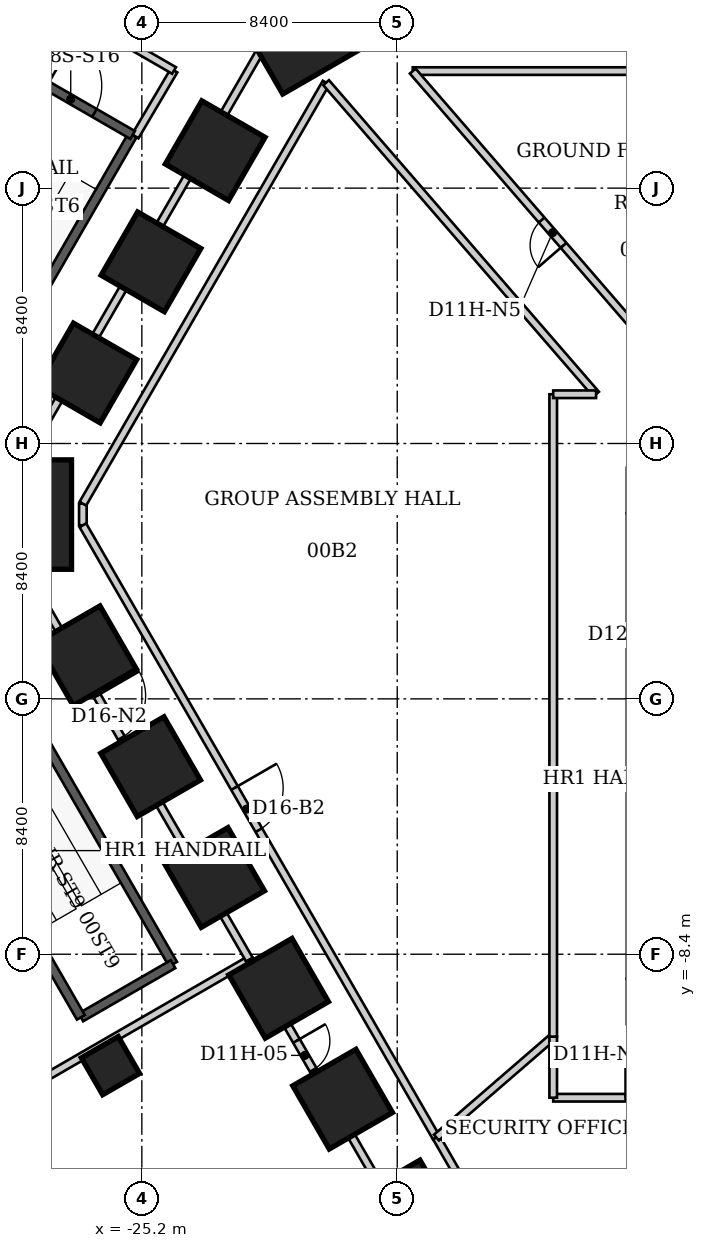
"""IFC4 building model, lengths in metres.
Left out: names, types, materials, properties, quantities, classifications, styles, units other than length and angle.
Written with IfcOpenShell. Run it as: python <this file> out.ifc"""

import sys

from ifc_helpers import new_model, si_unit, direction, frame, frame_2d, origin, origin_2d, place, context, subcontext, project, spatial, rectangle, extrude, element, fill, save


model = new_model("IFC4")
c1 = context("Model", 3, precision=1e-05, world=origin(), true_north=direction((0.0, 1.0)))
c2 = subcontext(c1, "Body", "Model", "MODEL_VIEW")
j1 = project(units=[si_unit("LENGTHUNIT", "METRE"), si_unit("PLANEANGLEUNIT", "RADIAN")], contexts=[c1])
p1 = place(None, origin())
s1 = spatial("IfcSite", under=j1, at=p1, CompositionType="ELEMENT")
p2 = place(p1, origin())
s2 = spatial("IfcBuilding", under=s1, at=p2, CompositionType="ELEMENT")
p3 = place(p2, origin())
s3 = spatial("IfcBuildingStorey", under=s2, at=p3, CompositionType="ELEMENT", Elevation=0.0)
for number, where, z_axis, x_axis in (
    (1, (-16.491, -16.813, -0.2), (0.0, 0.0, 1.0), (-0.866, -0.5, 0.0)),
    (2, (-18.596, -13.167, -0.2), (0.0, 0.0, 1.0), (-0.866, -0.5, 0.0)),
    (3, (-20.701, -9.521, -0.2), (0.0, 0.0, 1.0), (-0.866, -0.5, 0.0)),
    (4, (-22.806, -5.875, -0.2), (0.0, 0.0, 1.0), (-0.866, -0.5, 0.0)),
    (5, (-24.911, -2.23, -0.2), (0.0, 0.0, 1.0), (-0.866, -0.5, 0.0)),
    (6, (-27.016, 1.416, -0.2), (0.0, 0.0, 1.0), (-0.866, -0.5, 0.0)),
):
    element("IfcColumn", number, at=place(p3, frame(where, z_axis=z_axis, x_axis=x_axis)), inside=s3, PredefinedType="COLUMN", context=c2, shape_type="SweptSolid", body=[
        extrude(rectangle(XDim=2.4, YDim=2.4, at=origin_2d()), origin(), (0.0, 0.0, 1.0), 6.2),
    ])
p4 = place(p3, frame((-28.713, 6.062, -0.2), z_axis=(0.0, 0.0, 1.0), x_axis=(-1.0, 0.0, 0.0)))
e7 = element("IfcColumn", 7, at=p4, inside=s3, PredefinedType="COLUMN", context=c2, shape_type="SweptSolid", body=[
    extrude(rectangle(XDim=2.4, YDim=3.6, at=origin_2d()), origin(), (0.0, 0.0, 1.0), 6.2),
])
for number, where, z_axis, x_axis in (
    (8, (-27.01, 10.719, -0.2), (0.0, 0.0, 1.0), (-0.866, 0.5, 0.0)),
    (9, (-24.899, 14.375, -0.2), (0.0, 0.0, 1.0), (-0.866, 0.5, 0.0)),
    (10, (-22.788, 18.032, -0.2), (0.0, 0.0, 1.0), (-0.866, 0.5, 0.0)),
):
    element("IfcColumn", number, at=place(p3, frame(where, z_axis=z_axis, x_axis=x_axis)), inside=s3, PredefinedType="COLUMN", context=c2, shape_type="SweptSolid", body=[
        extrude(rectangle(XDim=2.4, YDim=2.4, at=origin_2d()), origin(), (0.0, 0.0, 1.0), 6.2),
    ])
p5 = place(p3, frame((-19.606, 21.835, -0.2), z_axis=(0.0, 0.0, 1.0), x_axis=(-0.5, 0.866025403784, 0.0)))
e11 = element("IfcColumn", 11, at=p5, inside=s3, PredefinedType="COLUMN", context=c2, shape_type="SweptSolid", body=[
    extrude(rectangle(XDim=2.4, YDim=3.6, at=origin_2d()), origin(), (0.0, 0.0, 1.0), 6.2),
])
p6 = place(p3, frame((-26.233, -12.065, -0.2), z_axis=(0.0, 0.0, 1.0), x_axis=(-0.866025403784, -0.5, 0.0)))
e12 = element("IfcColumn", 12, at=p6, inside=s3, PredefinedType="COLUMN", context=c2, shape_type="SweptSolid", body=[
    extrude(rectangle(XDim=1.4, YDim=1.4, at=origin_2d()), origin(), (0.0, 0.0, 1.0), 6.2),
])
p7 = place(p3, frame((-33.964, -15.685, 0.0), z_axis=(0.0, 0.0, 1.0), x_axis=(0.865990423019, 0.500060583569, 0.0)))
e13 = element("IfcWall", 13, at=p7, inside=s3, PredefinedType="PARTITIONING", context=c2, shape_type="SweptSolid", body=[
    extrude(rectangle(XDim=14.208, YDim=0.25, at=frame_2d((7.104, 0.0))), origin(), (0.0, 0.0, 1.0), 4.993),
])
p8 = place(p3, frame((-29.54, 5.06, 0.0), z_axis=(0.0, 0.0, 1.0), x_axis=(0.500237574973, -0.865888196354, 0.0)))
e14 = element("IfcWall", 14, at=p8, inside=s3, PredefinedType="PARTITIONING", context=c2, shape_type="SweptSolid", body=[
    extrude(rectangle(XDim=15.753, YDim=0.25, at=frame_2d((7.876, 0.0))), origin(), (0.0, 0.0, 1.0), 4.04),
])
p9 = place(p8, frame((5.726, 0.0, 0.0)))
e15 = element("IfcOpeningElement", 15, at=p9, cuts=e14, PredefinedType="OPENING", context=c2, shape_type="SweptSolid", body=[
    extrude(rectangle(XDim=1.6, YDim=2.4, at=frame_2d((0.8, 1.2))), frame((0.0, 0.125, 0.0), z_axis=(0.0, -1.0, 0.0), x_axis=(1.0, 0.0, 0.0)), (0.0, 0.0, 1.0), 0.25),
])
p10 = place(p3, frame((-27.14, 5.71, 0.0), z_axis=(0.0, 0.0, 1.0), x_axis=(0.0, 1.0, 0.0)))
e16 = element("IfcWall", 16, at=p10, inside=s3, PredefinedType="PARTITIONING", context=c2, shape_type="SweptSolid", body=[
    extrude(rectangle(XDim=0.71, YDim=0.25, at=frame_2d((0.355, 0.0))), origin(), (0.0, 0.0, 1.0), 5.84),
])
p11 = place(p3, frame((-27.14, 5.71, 0.0), z_axis=(0.0, 0.0, 1.0), x_axis=(0.499871788402, -0.866099414132, 0.0)))
e17 = element("IfcWall", 17, at=p11, inside=s3, PredefinedType="PARTITIONING", context=c2, shape_type="SweptSolid", body=[
    extrude(rectangle(XDim=23.257, YDim=0.25, at=frame_2d((11.628, 0.0))), origin(), (0.0, 0.0, 1.0), 5.84),
])
p12 = place(p11, frame((9.979, 0.0, 0.0)))
e18 = element("IfcOpeningElement", 18, at=p12, cuts=e17, PredefinedType="OPENING", context=c2, shape_type="SweptSolid", body=[
    extrude(rectangle(XDim=1.6, YDim=2.4, at=frame_2d((0.8, 1.2))), frame((0.0, 0.125, 0.0), z_axis=(0.0, -1.0, 0.0), x_axis=(1.0, 0.0, 0.0)), (0.0, 0.0, 1.0), 0.25),
])
p13 = place(p3, frame((-27.14, 6.42, 0.0), z_axis=(0.0, 0.0, 1.0), x_axis=(0.50017078562, 0.865926778205, 0.0)))
e19 = element("IfcWall", 19, at=p13, inside=s3, PredefinedType="PARTITIONING", context=c2, shape_type="SweptSolid", body=[
    extrude(rectangle(XDim=15.995, YDim=0.25, at=frame_2d((7.997, 0.0))), origin(), (0.0, 0.0, 1.0), 5.84),
])
p14 = place(p3, frame((-25.42, 18.5, 0.0), z_axis=(0.0, 0.0, 1.0), x_axis=(0.508082727165, 0.861308273707, 0.0)))
e20 = element("IfcWall", 20, at=p14, inside=s3, PredefinedType="PARTITIONING", context=c2, shape_type="SweptSolid", body=[
    extrude(rectangle(XDim=2.519, YDim=0.25, at=frame_2d((1.26, 0.0))), origin(), (0.0, 0.0, 1.0), 5.84),
])
p15 = place(p3, frame((-24.14, 20.67, 0.0), z_axis=(0.0, 0.0, 1.0), x_axis=(-0.866003524369, 0.500037894345, 0.0)))
e21 = element("IfcWall", 21, at=p15, inside=s3, PredefinedType="PARTITIONING", context=c2, shape_type="SweptSolid", body=[
    extrude(rectangle(XDim=15.409, YDim=0.25, at=frame_2d((7.705, 0.0))), origin(), (0.0, 0.0, 1.0), 5.083),
])
p16 = place(p3, frame((-21.66, -8.58, 0.0), z_axis=(0.0, 0.0, 1.0), x_axis=(0.50046740921, -0.865755376719, 0.0)))
e22 = element("IfcWall", 22, at=p16, inside=s3, PredefinedType="PARTITIONING", context=c2, shape_type="SweptSolid", body=[
    extrude(rectangle(XDim=9.171, YDim=0.25, at=frame_2d((4.585, 0.0))), origin(), (0.0, 0.0, 1.0), 4.04),
])
p17 = place(p16, frame((3.086, 0.0, 0.0)))
e23 = element("IfcOpeningElement", 23, at=p17, cuts=e22, PredefinedType="OPENING", context=c2, shape_type="SweptSolid", body=[
    extrude(rectangle(XDim=1.1, YDim=2.2, at=frame_2d((0.55, 1.1))), frame((0.0, 0.125, 0.0), z_axis=(0.0, -1.0, 0.0), x_axis=(1.0, 0.0, 0.0)), (0.0, 0.0, 1.0), 0.25),
])
p18 = place(p3, frame((-20.88, 22.05, 0.0), z_axis=(0.0, 0.0, 1.0), x_axis=(-0.500246113481, -0.865883263464, 0.0)))
e24 = element("IfcWall", 24, at=p18, inside=s3, PredefinedType="PARTITIONING", context=c2, shape_type="SweptSolid", body=[
    extrude(rectangle(XDim=17.312, YDim=0.25, at=frame_2d((8.656, 0.0))), origin(), (0.0, 0.0, 1.0), 4.04),
])
p19 = place(p3, frame((-19.14, 20.27, 0.0), z_axis=(0.0, 0.0, 1.0), x_axis=(0.654785227324, -0.755814994611, 0.0)))
e25 = element("IfcWall", 25, at=p19, inside=s3, PredefinedType="PARTITIONING", context=c2, shape_type="SweptSolid", body=[
    extrude(rectangle(XDim=13.562, YDim=0.25, at=frame_2d((6.781, 0.0))), origin(), (0.0, 0.0, 1.0), 5.84),
])
p20 = place(p3, frame((-16.29, 20.65, 0.0), z_axis=(0.0, 0.0, 1.0), x_axis=(1.0, 0.0, 0.0)))
e26 = element("IfcWall", 26, at=p20, inside=s3, PredefinedType="PARTITIONING", context=c2, shape_type="SweptSolid", body=[
    extrude(rectangle(XDim=12.29, YDim=0.25, at=frame_2d((6.145, 0.0))), origin(), (0.0, 0.0, 1.0), 5.84),
])
p21 = place(p3, frame((-15.51, -14.43, 0.0), z_axis=(0.0, 0.0, 1.0), x_axis=(0.497894326365, -0.867237706614, 0.0)))
e27 = element("IfcWall", 27, at=p21, inside=s3, PredefinedType="PARTITIONING", context=c2, shape_type="SweptSolid", body=[
    extrude(rectangle(XDim=2.41, YDim=0.25, at=frame_2d((1.205, 0.0))), origin(), (0.0, 0.0, 1.0), 5.84),
])
p22 = place(p3, frame((-11.67, -13.12, 0.0), z_axis=(0.0, 0.0, 1.0), x_axis=(1.0, 0.0, 0.0)))
e28 = element("IfcWall", 28, at=p22, inside=s3, PredefinedType="PARTITIONING", context=c2, shape_type="SweptSolid", body=[
    extrude(rectangle(XDim=5.86, YDim=0.25, at=frame_2d((2.93, 0.0))), origin(), (0.0, 0.0, 1.0), 5.84),
])
p23 = place(p22, frame((2.38, 0.0, 0.0)))
e29 = element("IfcOpeningElement", 29, at=p23, cuts=e28, PredefinedType="OPENING", context=c2, shape_type="SweptSolid", body=[
    extrude(rectangle(XDim=1.1, YDim=2.2, at=frame_2d((0.55, 1.1))), frame((0.0, 0.125, 0.0), z_axis=(0.0, -1.0, 0.0), x_axis=(1.0, 0.0, 0.0)), (0.0, 0.0, 1.0), 0.25),
])
p24 = place(p3, frame((-11.67, -11.11, 0.0), z_axis=(0.0, 0.0, 1.0), x_axis=(-0.756493073491, -0.654001704707, 0.0)))
e30 = element("IfcWall", 30, at=p24, inside=s3, PredefinedType="PARTITIONING", context=c2, shape_type="SweptSolid", body=[
    extrude(rectangle(XDim=5.076, YDim=0.25, at=frame_2d((2.538, 0.0))), origin(), (0.0, 0.0, 1.0), 5.238),
])
p25 = place(p3, frame((-11.67, -11.11, 0.0), z_axis=(0.0, 0.0, 1.0), x_axis=(0.0, -1.0, 0.0)))
e31 = element("IfcWall", 31, at=p25, inside=s3, PredefinedType="PARTITIONING", context=c2, shape_type="SweptSolid", body=[
    extrude(rectangle(XDim=2.01, YDim=0.25, at=frame_2d((1.005, 0.0))), origin(), (0.0, 0.0, 1.0), 5.84),
])
p26 = place(p3, frame((-11.67, 10.02, 0.0), z_axis=(0.0, 0.0, 1.0), x_axis=(0.0, -1.0, 0.0)))
e32 = element("IfcWall", 32, at=p26, inside=s3, PredefinedType="PARTITIONING", context=c2, shape_type="SweptSolid", body=[
    extrude(rectangle(XDim=21.13, YDim=0.25, at=frame_2d((10.565, 0.0))), origin(), (0.0, 0.0, 1.0), 5.84),
])
p27 = place(p3, frame((-10.26, 10.02, 0.0), z_axis=(0.0, 0.0, 1.0), x_axis=(-1.0, 0.0, 0.0)))
e33 = element("IfcWall", 33, at=p27, inside=s3, PredefinedType="PARTITIONING", context=c2, shape_type="SweptSolid", body=[
    extrude(rectangle(XDim=1.41, YDim=0.25, at=frame_2d((0.705, 0.0))), origin(), (0.0, 0.0, 1.0), 5.84),
])
p28 = place(p3, frame((-7.09, 10.02, 0.0), z_axis=(0.0, 0.0, 1.0), x_axis=(-0.654417990957, 0.756132986393, 0.0)))
e34 = element("IfcWall", 34, at=p28, inside=s3, PredefinedType="PARTITIONING", context=c2, shape_type="SweptSolid", body=[
    extrude(rectangle(XDim=14.058, YDim=0.25, at=frame_2d((7.029, 0.0))), origin(), (0.0, 0.0, 1.0), 5.84),
])
p29 = place(p28, frame((6.479, 0.0, 0.0)))
e35 = element("IfcOpeningElement", 35, at=p29, cuts=e34, PredefinedType="OPENING", context=c2, shape_type="SweptSolid", body=[
    extrude(rectangle(XDim=1.1, YDim=2.2, at=frame_2d((0.55, 1.1))), frame((0.0, 0.125, 0.0), z_axis=(0.0, -1.0, 0.0), x_axis=(1.0, 0.0, 0.0)), (0.0, 0.0, 1.0), 0.25),
])
p30 = place(p3, frame((-25.504, 18.548, 0.0), z_axis=(0.0, 0.0, 1.0), x_axis=(-0.500004225487, -0.866022964185, 0.0)))
e36 = element("IfcWall", 36, at=p30, inside=s3, PredefinedType="SHEAR", context=c2, shape_type="SweptSolid", body=[
    extrude(rectangle(XDim=9.3, YDim=0.3, at=frame_2d((4.65, 0.0))), origin(), (0.0, 0.0, 1.0), 6.0),
])
p31 = place(p3, frame((-29.574, 20.898, 0.0), z_axis=(0.0, 0.0, 1.0), x_axis=(0.866038532462, -0.499977259774, 0.0)))
e37 = element("IfcWall", 37, at=p31, inside=s3, PredefinedType="SHEAR", context=c2, shape_type="SweptSolid", body=[
    extrude(rectangle(XDim=4.7, YDim=0.3, at=frame_2d((2.35, 0.0))), origin(), (0.0, 0.0, 1.0), 6.0),
])
p32 = place(p31, frame((1.45, 0.0, 0.0)))
e38 = element("IfcOpeningElement", 38, at=p32, cuts=e37, PredefinedType="OPENING", context=c2, shape_type="SweptSolid", body=[
    extrude(rectangle(XDim=1.8, YDim=2.4, at=frame_2d((0.9, 1.2))), frame((0.0, 0.15, 0.0), z_axis=(0.0, -1.0, 0.0), x_axis=(1.0, 0.0, 0.0)), (0.0, 0.0, 1.0), 0.3),
])
p33 = place(p3, frame((-28.824, -0.672, 0.0), z_axis=(0.0, 0.0, 1.0), x_axis=(0.499984536904, -0.866034331223, 0.0)))
e39 = element("IfcWall", 39, at=p33, inside=s3, PredefinedType="SHEAR", context=c2, shape_type="SweptSolid", body=[
    extrude(rectangle(XDim=9.3, YDim=0.3, at=frame_2d((4.65, 0.0))), origin(), (0.0, 0.0, 1.0), 6.0),
])
p34 = place(p3, frame((-24.174, -8.727, 0.0), z_axis=(0.0, 0.0, 1.0), x_axis=(-0.866019471182, -0.500010275428, 0.0)))
e40 = element("IfcWall", 40, at=p34, inside=s3, PredefinedType="SHEAR", context=c2, shape_type="SweptSolid", body=[
    extrude(rectangle(XDim=3.5, YDim=0.3, at=frame_2d((1.75, 0.0))), origin(), (0.0, 0.0, 1.0), 6.0),
])
p35 = place(p3, frame((-27.205, -10.477, 0.0), z_axis=(0.0, 0.0, 1.0), x_axis=(-0.499984536904, 0.866034331223, 0.0)))
e41 = element("IfcWall", 41, at=p35, inside=s3, PredefinedType="SHEAR", context=c2, shape_type="SweptSolid", body=[
    extrude(rectangle(XDim=9.3, YDim=0.3, at=frame_2d((4.65, 0.0))), origin(), (0.0, 0.0, 1.0), 6.0),
])
p36 = place(p17, origin())
e42 = element("IfcDoor", 42, at=p36, inside=s3, OperationType="SINGLE_SWING_LEFT", PredefinedType="DOOR", context=c2, shape_type="SweptSolid", body=[
    extrude(rectangle(XDim=1.1, YDim=2.2, at=frame_2d((0.55, 1.1))), frame((0.0, 0.025, 0.0), z_axis=(0.0, -1.0, 0.0), x_axis=(1.0, 0.0, 0.0)), (0.0, 0.0, 1.0), 0.05),
])
fill(e23, e42)
p37 = place(p12, origin())
e43 = element("IfcDoor", 43, at=p37, inside=s3, OperationType="DOUBLE_DOOR_SINGLE_SWING", PredefinedType="DOOR", context=c2, shape_type="SweptSolid", body=[
    extrude(rectangle(XDim=1.6, YDim=2.4, at=frame_2d((0.8, 1.2))), frame((0.0, 0.025, 0.0), z_axis=(0.0, -1.0, 0.0), x_axis=(1.0, 0.0, 0.0)), (0.0, 0.0, 1.0), 0.05),
])
fill(e18, e43)
p38 = place(p9, origin())
e44 = element("IfcDoor", 44, at=p38, inside=s3, OperationType="DOUBLE_DOOR_SINGLE_SWING", PredefinedType="DOOR", context=c2, shape_type="SweptSolid", body=[
    extrude(rectangle(XDim=1.6, YDim=2.4, at=frame_2d((0.8, 1.2))), frame((0.0, 0.025, 0.0), z_axis=(0.0, -1.0, 0.0), x_axis=(1.0, 0.0, 0.0)), (0.0, 0.0, 1.0), 0.05),
])
fill(e15, e44)
p39 = place(p29, origin())
e45 = element("IfcDoor", 45, at=p39, inside=s3, OperationType="SINGLE_SWING_LEFT", PredefinedType="DOOR", context=c2, shape_type="SweptSolid", body=[
    extrude(rectangle(XDim=1.1, YDim=2.2, at=frame_2d((0.55, 1.1))), frame((0.0, 0.025, 0.0), z_axis=(0.0, -1.0, 0.0), x_axis=(1.0, 0.0, 0.0)), (0.0, 0.0, 1.0), 0.05),
])
fill(e35, e45)
p40 = place(p23, origin())
e46 = element("IfcDoor", 46, at=p40, inside=s3, OperationType="SINGLE_SWING_LEFT", PredefinedType="DOOR", context=c2, shape_type="SweptSolid", body=[
    extrude(rectangle(XDim=1.1, YDim=2.2, at=frame_2d((0.55, 1.1))), frame((0.0, 0.025, 0.0), z_axis=(0.0, -1.0, 0.0), x_axis=(1.0, 0.0, 0.0)), (0.0, 0.0, 1.0), 0.05),
])
fill(e29, e46)
p41 = place(p32, origin())
e47 = element("IfcDoor", 47, at=p41, inside=s3, OperationType="DOUBLE_DOOR_SINGLE_SWING", PredefinedType="DOOR", context=c2, shape_type="SweptSolid", body=[
    extrude(rectangle(XDim=1.8, YDim=2.4, at=frame_2d((0.9, 1.2))), frame((0.0, 0.025, 0.0), z_axis=(0.0, -1.0, 0.0), x_axis=(1.0, 0.0, 0.0)), (0.0, 0.0, 1.0), 0.05),
])
fill(e38, e47)
save(model, sys.argv[1])
